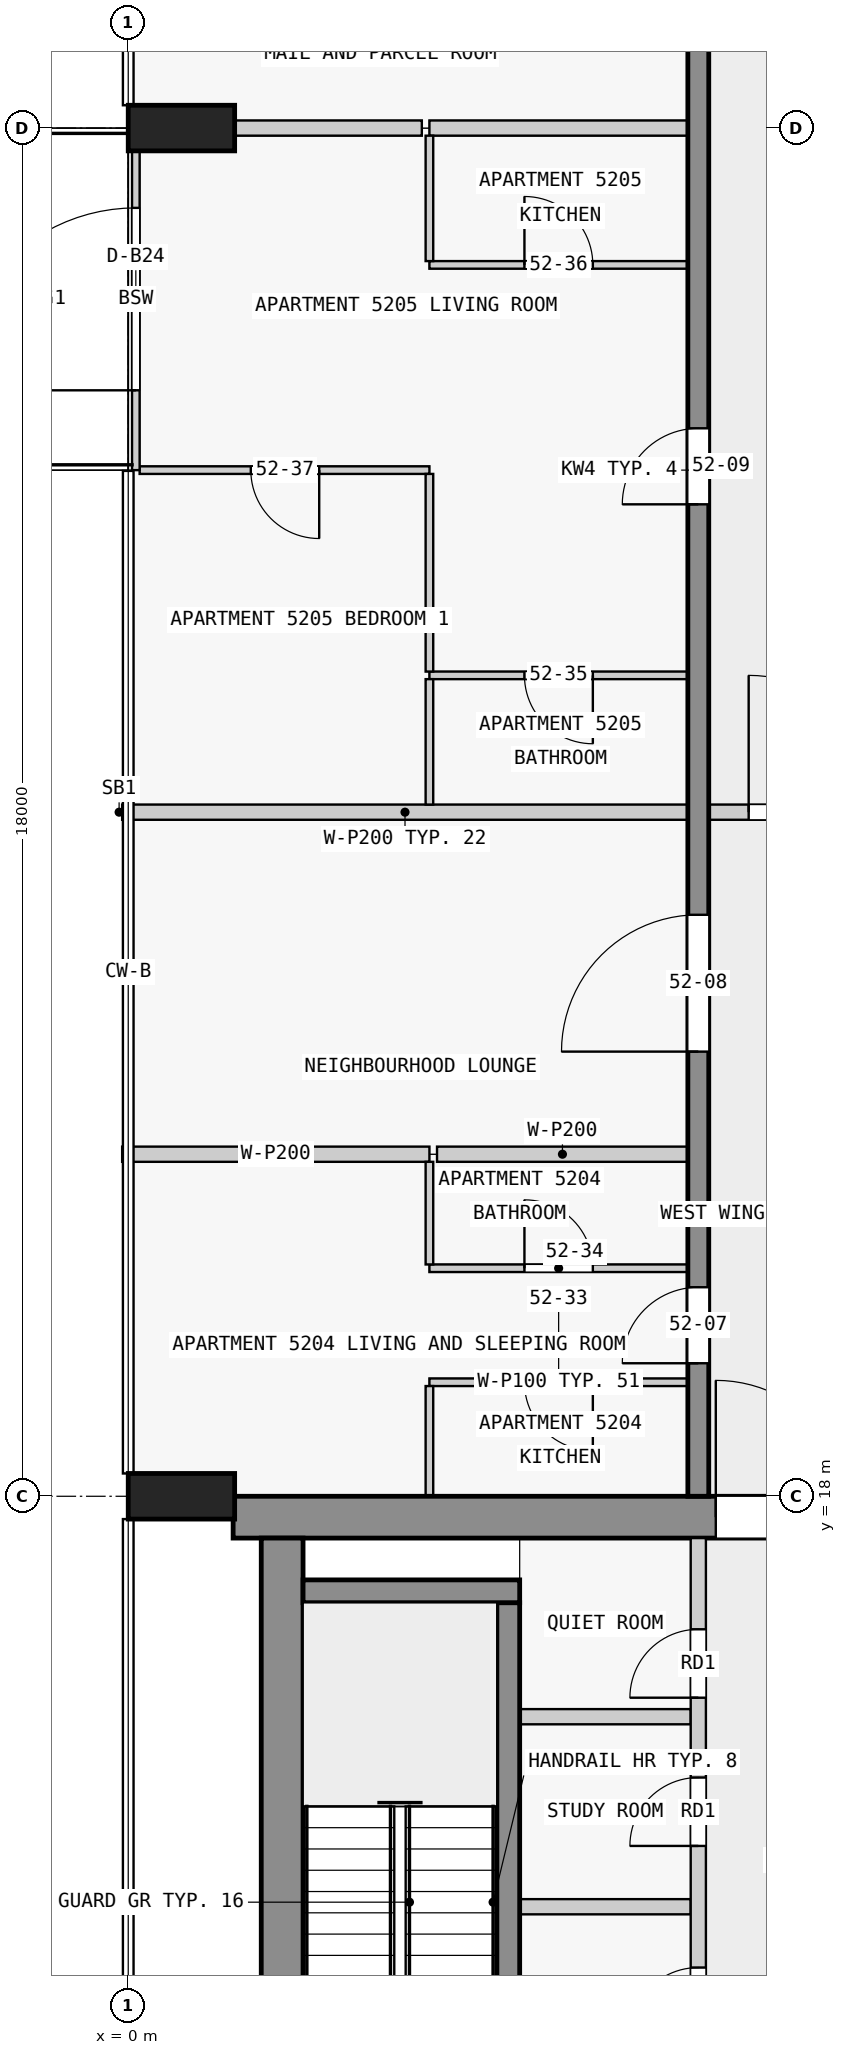
"""IFC4 building model, lengths in metres.
Left out: names, types, materials, properties, quantities, classifications, styles, units other than length and angle.
Written with IfcOpenShell. Run it as: python <this file> out.ifc"""

import sys

from ifc_helpers import new_model, si_unit, direction, frame, frame_2d, origin, origin_2d, place, context, subcontext, project, spatial, rectangle, extrude, element, fill, save


model = new_model("IFC4")
c1 = context("Model", 3, precision=1e-05, world=origin(), true_north=direction((0.0, 1.0)))
c2 = subcontext(c1, "Body", "Model", "MODEL_VIEW")
j1 = project(units=[si_unit("LENGTHUNIT", "METRE"), si_unit("PLANEANGLEUNIT", "RADIAN")], contexts=[c1])
p1 = place(None, origin())
s1 = spatial("IfcSite", under=j1, at=p1, CompositionType="ELEMENT")
p2 = place(p1, origin())
s2 = spatial("IfcBuilding", under=s1, at=p2, CompositionType="ELEMENT")
p3 = place(p2, frame((0.0, 0.0, 201.4)))
s3 = spatial("IfcBuildingStorey", under=s2, at=p3, CompositionType="ELEMENT", Elevation=201.4)
for number, where, z_axis, x_axis in (
    (1, (0.7, 36.0, 0.0), (0.0, 0.0, 1.0), (0.0, 1.0, 0.0)),
    (2, (0.7, 18.0, 0.0), (0.0, 0.0, 1.0), (0.0, 1.0, 0.0)),
):
    element("IfcColumn", number, at=place(p3, frame(where, z_axis=z_axis, x_axis=x_axis)), inside=s3, PredefinedType="COLUMN", context=c2, shape_type="SweptSolid", body=[
        extrude(rectangle(XDim=0.6, YDim=1.4, at=origin_2d()), origin(), (0.0, 0.0, 1.0), 3.5),
    ])
p4 = place(p3, frame((1.38, 17.725, 0.0), z_axis=(0.0, 0.0, 1.0), x_axis=(1.0, 0.0, 0.0)))
e3 = element("IfcWall", 3, at=p4, inside=s3, PredefinedType="SHEAR", context=c2, shape_type="SweptSolid", body=[
    extrude(rectangle(XDim=21.12, YDim=0.55, at=frame_2d((10.56, 0.0))), origin(), (0.0, 0.0, 1.0), 3.25),
])
p5 = place(p4, frame((6.35, 0.0, 0.0)))
e4 = element("IfcOpeningElement", 4, at=p5, cuts=e3, PredefinedType="OPENING", context=c2, shape_type="SweptSolid", body=[
    extrude(rectangle(XDim=1.8, YDim=2.1, at=frame_2d((0.9, 1.05))), frame((0.0, 0.285, 0.0), z_axis=(0.0, -1.0, 0.0), x_axis=(1.0, 0.0, 0.0)), (0.0, 0.0, 1.0), 0.57),
])
p6 = place(p3, frame((2.025, 2.5, 0.0), z_axis=(0.0, 0.0, 1.0), x_axis=(0.0, 1.0, 0.0)))
e5 = element("IfcWall", 5, at=p6, inside=s3, PredefinedType="SHEAR", context=c2, shape_type="SweptSolid", body=[
    extrude(rectangle(XDim=14.95, YDim=0.55, at=frame_2d((7.475, 0.0))), origin(), (0.0, 0.0, 1.0), 3.25),
])
p7 = place(p3, frame((5.0, 10.2, 0.0), z_axis=(0.0, 0.0, 1.0), x_axis=(0.0, 1.0, 0.0)))
e6 = element("IfcWall", 6, at=p7, inside=s3, PredefinedType="SHEAR", context=c2, shape_type="SweptSolid", body=[
    extrude(rectangle(XDim=6.4, YDim=0.3, at=frame_2d((3.2, 0.0))), origin(), (0.0, 0.0, 1.0), 3.25),
])
p8 = place(p3, frame((2.3, 16.75, 0.0), z_axis=(0.0, 0.0, 1.0), x_axis=(1.0, 0.0, 0.0)))
e7 = element("IfcWall", 7, at=p8, inside=s3, PredefinedType="SHEAR", context=c2, shape_type="SweptSolid", body=[
    extrude(rectangle(XDim=2.85, YDim=0.3, at=frame_2d((1.425, 0.0))), origin(), (0.0, 0.0, 1.0), 3.25),
])
p9 = place(p3, frame((7.5, 18.0, 0.0), z_axis=(0.0, 0.0, 1.0), x_axis=(0.0, 1.0, 0.0)))
e8 = element("IfcWall", 8, at=p9, inside=s3, PredefinedType="SHEAR", context=c2, shape_type="SweptSolid", body=[
    extrude(rectangle(XDim=27.0, YDim=0.275, at=frame_2d((13.5, 0.0))), origin(), (0.0, 0.0, 1.0), 3.25),
])
p10 = place(p9, frame((1.75, 0.0, 0.0)))
e9 = element("IfcOpeningElement", 9, at=p10, cuts=e8, PredefinedType="OPENING", context=c2, shape_type="SweptSolid", body=[
    extrude(rectangle(XDim=1.0, YDim=2.1, at=frame_2d((0.5, 1.05))), frame((0.0, 0.147, 0.0), z_axis=(0.0, -1.0, 0.0), x_axis=(1.0, 0.0, 0.0)), (0.0, 0.0, 1.0), 0.295),
])
p11 = place(p9, frame((5.85, 0.0, 0.0)))
e10 = element("IfcOpeningElement", 10, at=p11, cuts=e8, PredefinedType="OPENING", context=c2, shape_type="SweptSolid", body=[
    extrude(rectangle(XDim=1.8, YDim=2.1, at=frame_2d((0.9, 1.05))), frame((0.0, 0.147, 0.0), z_axis=(0.0, -1.0, 0.0), x_axis=(1.0, 0.0, 0.0)), (0.0, 0.0, 1.0), 0.295),
])
p12 = place(p9, frame((13.05, 0.0, 0.0)))
e11 = element("IfcOpeningElement", 11, at=p12, cuts=e8, PredefinedType="OPENING", context=c2, shape_type="SweptSolid", body=[
    extrude(rectangle(XDim=1.0, YDim=2.1, at=frame_2d((0.5, 1.05))), frame((0.0, 0.147, 0.0), z_axis=(0.0, -1.0, 0.0), x_axis=(1.0, 0.0, 0.0)), (0.0, 0.0, 1.0), 0.295),
])
p13 = place(p9, frame((19.75, 0.0, 0.0)))
e12 = element("IfcOpeningElement", 12, at=p13, cuts=e8, PredefinedType="OPENING", context=c2, shape_type="SweptSolid", body=[
    extrude(rectangle(XDim=1.0, YDim=2.1, at=frame_2d((0.5, 1.05))), frame((0.0, 0.147, 0.0), z_axis=(0.0, -1.0, 0.0), x_axis=(1.0, 0.0, 0.0)), (0.0, 0.0, 1.0), 0.295),
])
p14 = place(p9, frame((23.25, 0.0, 0.0)))
e13 = element("IfcOpeningElement", 13, at=p14, cuts=e8, PredefinedType="OPENING", context=c2, shape_type="SweptSolid", body=[
    extrude(rectangle(XDim=0.9, YDim=2.1, at=frame_2d((0.45, 1.05))), frame((0.0, 0.147, 0.0), z_axis=(0.0, -1.0, 0.0), x_axis=(1.0, 0.0, 0.0)), (0.0, 0.0, 1.0), 0.295),
])
p15 = place(p9, frame((25.45, 0.0, 0.0)))
e14 = element("IfcOpeningElement", 14, at=p15, cuts=e8, PredefinedType="OPENING", context=c2, shape_type="SweptSolid", body=[
    extrude(rectangle(XDim=1.0, YDim=2.1, at=frame_2d((0.5, 1.05))), frame((0.0, 0.147, 0.0), z_axis=(0.0, -1.0, 0.0), x_axis=(1.0, 0.0, 0.0)), (0.0, 0.0, 1.0), 0.295),
])
p16 = place(p3, frame((0.1, 31.5, 0.0), z_axis=(0.0, 0.0, 1.0), x_axis=(0.0, 1.0, 0.0)))
e15 = element("IfcWall", 15, at=p16, inside=s3, PredefinedType="STANDARD", context=c2, shape_type="SweptSolid", body=[
    extrude(rectangle(XDim=4.5, YDim=0.1, at=frame_2d((2.25, 0.0))), origin(), (0.0, 0.0, 1.0), 3.25),
])
p17 = place(p16, frame((1.05, 0.0, 0.0)))
e16 = element("IfcOpeningElement", 16, at=p17, cuts=e15, PredefinedType="OPENING", context=c2, shape_type="SweptSolid", body=[
    extrude(rectangle(XDim=2.4, YDim=2.4, at=frame_2d((1.2, 1.2))), frame((0.0, 0.06, 0.0), z_axis=(0.0, -1.0, 0.0), x_axis=(1.0, 0.0, 0.0)), (0.0, 0.0, 1.0), 0.12),
])
p18 = place(p3, frame((7.5, 10.1, 0.0), z_axis=(0.0, 0.0, 1.0), x_axis=(0.0, 1.0, 0.0)))
e17 = element("IfcWall", 17, at=p18, inside=s3, PredefinedType="PARTITIONING", context=c2, shape_type="SweptSolid", body=[
    extrude(rectangle(XDim=7.35, YDim=0.2, at=frame_2d((3.675, 0.0))), origin(), (0.0, 0.0, 1.0), 3.25),
])
p19 = place(p18, frame((0.8, 0.0, 0.0)))
e18 = element("IfcOpeningElement", 18, at=p19, cuts=e17, PredefinedType="OPENING", context=c2, shape_type="SweptSolid", body=[
    extrude(rectangle(XDim=0.9, YDim=2.1, at=frame_2d((0.45, 1.05))), frame((0.0, 0.11, 0.0), z_axis=(0.0, -1.0, 0.0), x_axis=(1.0, 0.0, 0.0)), (0.0, 0.0, 1.0), 0.22),
])
p20 = place(p18, frame((3.3, 0.0, 0.0)))
e19 = element("IfcOpeningElement", 19, at=p20, cuts=e17, PredefinedType="OPENING", context=c2, shape_type="SweptSolid", body=[
    extrude(rectangle(XDim=0.9, YDim=2.1, at=frame_2d((0.45, 1.05))), frame((0.0, 0.11, 0.0), z_axis=(0.0, -1.0, 0.0), x_axis=(1.0, 0.0, 0.0)), (0.0, 0.0, 1.0), 0.22),
])
p21 = place(p18, frame((5.25, 0.0, 0.0)))
e20 = element("IfcOpeningElement", 20, at=p21, cuts=e17, PredefinedType="OPENING", context=c2, shape_type="SweptSolid", body=[
    extrude(rectangle(XDim=0.9, YDim=2.1, at=frame_2d((0.45, 1.05))), frame((0.0, 0.11, 0.0), z_axis=(0.0, -1.0, 0.0), x_axis=(1.0, 0.0, 0.0)), (0.0, 0.0, 1.0), 0.22),
])
for number, where, z_axis, x_axis in (
    (21, (5.15, 12.6, 0.0), (0.0, 0.0, 1.0), (1.0, 0.0, 0.0)),
    (22, (5.15, 15.1, 0.0), (0.0, 0.0, 1.0), (1.0, 0.0, 0.0)),
):
    element("IfcWall", number, at=place(p3, frame(where, z_axis=z_axis, x_axis=x_axis)), inside=s3, PredefinedType="PARTITIONING", context=c2, shape_type="SweptSolid", body=[
        extrude(rectangle(XDim=2.25, YDim=0.2, at=frame_2d((1.125, 0.0))), origin(), (0.0, 0.0, 1.0), 3.25),
    ])
p22 = place(p3, frame((7.363, 19.5, 0.0), z_axis=(0.0, 0.0, 1.0), x_axis=(-1.0, 0.0, 0.0)))
e23 = element("IfcWall", 23, at=p22, inside=s3, PredefinedType="PARTITIONING", context=c2, shape_type="SweptSolid", body=[
    extrude(rectangle(XDim=3.4, YDim=0.1, at=frame_2d((1.7, 0.0))), origin(), (0.0, 0.0, 1.0), 3.25),
])
p23 = place(p22, frame((1.25, 0.0, 0.0)))
e24 = element("IfcOpeningElement", 24, at=p23, cuts=e23, PredefinedType="OPENING", context=c2, shape_type="SweptSolid", body=[
    extrude(rectangle(XDim=0.9, YDim=2.1, at=frame_2d((0.45, 1.05))), frame((0.0, 0.06, 0.0), z_axis=(0.0, -1.0, 0.0), x_axis=(1.0, 0.0, 0.0)), (0.0, 0.0, 1.0), 0.12),
])
p24 = place(p3, frame((3.962, 21.0, 0.0), z_axis=(0.0, 0.0, 1.0), x_axis=(1.0, 0.0, 0.0)))
e25 = element("IfcWall", 25, at=p24, inside=s3, PredefinedType="PARTITIONING", context=c2, shape_type="SweptSolid", body=[
    extrude(rectangle(XDim=3.4, YDim=0.1, at=frame_2d((1.7, 0.0))), origin(), (0.0, 0.0, 1.0), 3.25),
])
p25 = place(p24, frame((1.25, 0.0, 0.0)))
e26 = element("IfcOpeningElement", 26, at=p25, cuts=e25, PredefinedType="OPENING", context=c2, shape_type="SweptSolid", body=[
    extrude(rectangle(XDim=0.9, YDim=2.1, at=frame_2d((0.45, 1.05))), frame((0.0, 0.06, 0.0), z_axis=(0.0, -1.0, 0.0), x_axis=(1.0, 0.0, 0.0)), (0.0, 0.0, 1.0), 0.12),
])
p26 = place(p3, frame((7.363, 22.5, 0.0), z_axis=(0.0, 0.0, 1.0), x_axis=(-1.0, 0.0, 0.0)))
e27 = element("IfcWall", 27, at=p26, inside=s3, PredefinedType="PARTITIONING", context=c2, shape_type="SweptSolid", body=[
    extrude(rectangle(XDim=3.3, YDim=0.2, at=frame_2d((1.65, 0.0))), origin(), (0.0, 0.0, 1.0), 3.25),
])
p27 = place(p3, frame((-0.08, 22.5, 0.0), z_axis=(0.0, 0.0, 1.0), x_axis=(1.0, 0.0, 0.0)))
e28 = element("IfcWall", 28, at=p27, inside=s3, PredefinedType="PARTITIONING", context=c2, shape_type="SweptSolid", body=[
    extrude(rectangle(XDim=4.042, YDim=0.2, at=frame_2d((2.021, 0.0))), origin(), (0.0, 0.0, 1.0), 3.25),
])
p28 = place(p3, frame((7.363, 27.0, 0.0), z_axis=(0.0, 0.0, 1.0), x_axis=(-1.0, 0.0, 0.0)))
e29 = element("IfcWall", 29, at=p28, inside=s3, PredefinedType="PARTITIONING", context=c2, shape_type="SweptSolid", body=[
    extrude(rectangle(XDim=7.443, YDim=0.2, at=frame_2d((3.721, 0.0))), origin(), (0.0, 0.0, 1.0), 3.25),
])
p29 = place(p3, frame((7.363, 28.8, 0.0), z_axis=(0.0, 0.0, 1.0), x_axis=(-1.0, 0.0, 0.0)))
e30 = element("IfcWall", 30, at=p29, inside=s3, PredefinedType="PARTITIONING", context=c2, shape_type="SweptSolid", body=[
    extrude(rectangle(XDim=3.4, YDim=0.1, at=frame_2d((1.7, 0.0))), origin(), (0.0, 0.0, 1.0), 3.25),
])
p30 = place(p29, frame((1.25, 0.0, 0.0)))
e31 = element("IfcOpeningElement", 31, at=p30, cuts=e30, PredefinedType="OPENING", context=c2, shape_type="SweptSolid", body=[
    extrude(rectangle(XDim=0.9, YDim=2.1, at=frame_2d((0.45, 1.05))), frame((0.0, 0.06, 0.0), z_axis=(0.0, -1.0, 0.0), x_axis=(1.0, 0.0, 0.0)), (0.0, 0.0, 1.0), 0.12),
])
p31 = place(p3, frame((3.962, 31.5, 0.0), z_axis=(0.0, 0.0, 1.0), x_axis=(-1.0, 0.0, 0.0)))
e32 = element("IfcWall", 32, at=p31, inside=s3, PredefinedType="PARTITIONING", context=c2, shape_type="SweptSolid", body=[
    extrude(rectangle(XDim=3.812, YDim=0.1, at=frame_2d((1.906, 0.0))), origin(), (0.0, 0.0, 1.0), 3.25),
])
p32 = place(p31, frame((1.45, 0.0, 0.0)))
e33 = element("IfcOpeningElement", 33, at=p32, cuts=e32, PredefinedType="OPENING", context=c2, shape_type="SweptSolid", body=[
    extrude(rectangle(XDim=0.9, YDim=2.1, at=frame_2d((0.45, 1.05))), frame((0.0, 0.06, 0.0), z_axis=(0.0, -1.0, 0.0), x_axis=(1.0, 0.0, 0.0)), (0.0, 0.0, 1.0), 0.12),
])
p33 = place(p3, frame((3.962, 34.2, 0.0), z_axis=(0.0, 0.0, 1.0), x_axis=(1.0, 0.0, 0.0)))
e34 = element("IfcWall", 34, at=p33, inside=s3, PredefinedType="PARTITIONING", context=c2, shape_type="SweptSolid", body=[
    extrude(rectangle(XDim=3.4, YDim=0.1, at=frame_2d((1.7, 0.0))), origin(), (0.0, 0.0, 1.0), 3.25),
])
p34 = place(p33, frame((1.25, 0.0, 0.0)))
e35 = element("IfcOpeningElement", 35, at=p34, cuts=e34, PredefinedType="OPENING", context=c2, shape_type="SweptSolid", body=[
    extrude(rectangle(XDim=0.9, YDim=2.1, at=frame_2d((0.45, 1.05))), frame((0.0, 0.06, 0.0), z_axis=(0.0, -1.0, 0.0), x_axis=(1.0, 0.0, 0.0)), (0.0, 0.0, 1.0), 0.12),
])
p35 = place(p3, frame((7.363, 36.0, 0.0), z_axis=(0.0, 0.0, 1.0), x_axis=(-1.0, 0.0, 0.0)))
e36 = element("IfcWall", 36, at=p35, inside=s3, PredefinedType="PARTITIONING", context=c2, shape_type="SweptSolid", body=[
    extrude(rectangle(XDim=3.4, YDim=0.2, at=frame_2d((1.7, 0.0))), origin(), (0.0, 0.0, 1.0), 3.25),
])
p36 = place(p3, frame((1.4, 36.0, 0.0), z_axis=(0.0, 0.0, 1.0), x_axis=(1.0, 0.0, 0.0)))
e37 = element("IfcWall", 37, at=p36, inside=s3, PredefinedType="PARTITIONING", context=c2, shape_type="SweptSolid", body=[
    extrude(rectangle(XDim=2.463, YDim=0.2, at=frame_2d((1.231, 0.0))), origin(), (0.0, 0.0, 1.0), 3.25),
])
p37 = place(p3, frame((3.962, 19.45, 0.0), z_axis=(0.0, 0.0, 1.0), x_axis=(0.0, -1.0, 0.0)))
e38 = element("IfcWall", 38, at=p37, inside=s3, PredefinedType="PARTITIONING", context=c2, shape_type="SweptSolid", body=[
    extrude(rectangle(XDim=1.45, YDim=0.1, at=frame_2d((0.725, 0.0))), origin(), (0.0, 0.0, 1.0), 3.25),
])
p38 = place(p3, frame((3.962, 22.4, 0.0), z_axis=(0.0, 0.0, 1.0), x_axis=(0.0, -1.0, 0.0)))
e39 = element("IfcWall", 39, at=p38, inside=s3, PredefinedType="PARTITIONING", context=c2, shape_type="SweptSolid", body=[
    extrude(rectangle(XDim=1.35, YDim=0.1, at=frame_2d((0.675, 0.0))), origin(), (0.0, 0.0, 1.0), 3.25),
])
for number, where, z_axis, x_axis in (
    (40, (3.962, 28.75, 0.0), (0.0, 0.0, 1.0), (0.0, -1.0, 0.0)),
    (41, (3.962, 35.9, 0.0), (0.0, 0.0, 1.0), (0.0, -1.0, 0.0)),
):
    element("IfcWall", number, at=place(p3, frame(where, z_axis=z_axis, x_axis=x_axis)), inside=s3, PredefinedType="PARTITIONING", context=c2, shape_type="SweptSolid", body=[
        extrude(rectangle(XDim=1.65, YDim=0.1, at=frame_2d((0.825, 0.0))), origin(), (0.0, 0.0, 1.0), 3.25),
    ])
p39 = place(p3, frame((3.962, 28.85, 0.0), z_axis=(0.0, 0.0, 1.0), x_axis=(0.0, 1.0, 0.0)))
e42 = element("IfcWall", 42, at=p39, inside=s3, PredefinedType="PARTITIONING", context=c2, shape_type="SweptSolid", body=[
    extrude(rectangle(XDim=2.6, YDim=0.1, at=frame_2d((1.3, 0.0))), origin(), (0.0, 0.0, 1.0), 3.25),
])
p40 = place(p3, frame((7.462, 27.0, 0.0), z_axis=(0.0, 0.0, 1.0), x_axis=(1.0, 0.0, 0.0)))
e43 = element("IfcWall", 43, at=p40, inside=s3, PredefinedType="PARTITIONING", context=c2, shape_type="SweptSolid", body=[
    extrude(rectangle(XDim=3.175, YDim=0.2, at=frame_2d((1.587, 0.0))), origin(), (0.0, 0.0, 1.0), 3.25),
])
p41 = place(p40, frame((0.7, 0.0, 0.0)))
e44 = element("IfcOpeningElement", 44, at=p41, cuts=e43, PredefinedType="OPENING", context=c2, shape_type="SweptSolid", body=[
    extrude(rectangle(XDim=1.8, YDim=2.1, at=frame_2d((0.9, 1.05))), frame((0.0, 0.11, 0.0), z_axis=(0.0, -1.0, 0.0), x_axis=(1.0, 0.0, 0.0)), (0.0, 0.0, 1.0), 0.22),
])
p42 = place(p17, origin())
e45 = element("IfcDoor", 45, at=p42, inside=s3, OperationType="SINGLE_SWING_LEFT", PredefinedType="DOOR", context=c2, shape_type="SweptSolid", body=[
    extrude(rectangle(XDim=2.4, YDim=2.4, at=frame_2d((1.2, 1.2))), frame((0.0, 0.025, 0.0), z_axis=(0.0, -1.0, 0.0), x_axis=(1.0, 0.0, 0.0)), (0.0, 0.0, 1.0), 0.05),
])
fill(e16, e45)
p43 = place(p5, origin())
e46 = element("IfcDoor", 46, at=p43, inside=s3, OperationType="DOUBLE_DOOR_SINGLE_SWING", PredefinedType="DOOR", context=c2, shape_type="SweptSolid", body=[
    extrude(rectangle(XDim=1.8, YDim=2.1, at=frame_2d((0.9, 1.05))), frame((0.0, 0.025, 0.0), z_axis=(0.0, -1.0, 0.0), x_axis=(1.0, 0.0, 0.0)), (0.0, 0.0, 1.0), 0.05),
])
fill(e4, e46)
p44 = place(p19, origin())
e47 = element("IfcDoor", 47, at=p44, inside=s3, OperationType="SINGLE_SWING_RIGHT", PredefinedType="DOOR", context=c2, shape_type="SweptSolid", body=[
    extrude(rectangle(XDim=0.9, YDim=2.1, at=frame_2d((0.45, 1.05))), frame((0.0, 0.025, 0.0), z_axis=(0.0, -1.0, 0.0), x_axis=(1.0, 0.0, 0.0)), (0.0, 0.0, 1.0), 0.05),
])
fill(e18, e47)
p45 = place(p20, origin())
e48 = element("IfcDoor", 48, at=p45, inside=s3, OperationType="SINGLE_SWING_RIGHT", PredefinedType="DOOR", context=c2, shape_type="SweptSolid", body=[
    extrude(rectangle(XDim=0.9, YDim=2.1, at=frame_2d((0.45, 1.05))), frame((0.0, 0.025, 0.0), z_axis=(0.0, -1.0, 0.0), x_axis=(1.0, 0.0, 0.0)), (0.0, 0.0, 1.0), 0.05),
])
fill(e19, e48)
p46 = place(p21, origin())
e49 = element("IfcDoor", 49, at=p46, inside=s3, OperationType="SINGLE_SWING_RIGHT", PredefinedType="DOOR", context=c2, shape_type="SweptSolid", body=[
    extrude(rectangle(XDim=0.9, YDim=2.1, at=frame_2d((0.45, 1.05))), frame((0.0, 0.025, 0.0), z_axis=(0.0, -1.0, 0.0), x_axis=(1.0, 0.0, 0.0)), (0.0, 0.0, 1.0), 0.05),
])
fill(e20, e49)
p47 = place(p10, origin())
e50 = element("IfcDoor", 50, at=p47, inside=s3, OperationType="SINGLE_SWING_LEFT", PredefinedType="DOOR", context=c2, shape_type="SweptSolid", body=[
    extrude(rectangle(XDim=1.0, YDim=2.1, at=frame_2d((0.5, 1.05))), frame((0.0, 0.025, 0.0), z_axis=(0.0, -1.0, 0.0), x_axis=(1.0, 0.0, 0.0)), (0.0, 0.0, 1.0), 0.05),
])
fill(e9, e50)
p48 = place(p11, origin())
e51 = element("IfcDoor", 51, at=p48, inside=s3, OperationType="SINGLE_SWING_LEFT", PredefinedType="DOOR", context=c2, shape_type="SweptSolid", body=[
    extrude(rectangle(XDim=1.8, YDim=2.1, at=frame_2d((0.9, 1.05))), frame((0.0, 0.025, 0.0), z_axis=(0.0, -1.0, 0.0), x_axis=(1.0, 0.0, 0.0)), (0.0, 0.0, 1.0), 0.05),
])
fill(e10, e51)
p49 = place(p12, origin())
e52 = element("IfcDoor", 52, at=p49, inside=s3, OperationType="SINGLE_SWING_RIGHT", PredefinedType="DOOR", context=c2, shape_type="SweptSolid", body=[
    extrude(rectangle(XDim=1.0, YDim=2.1, at=frame_2d((0.5, 1.05))), frame((0.0, 0.025, 0.0), z_axis=(0.0, -1.0, 0.0), x_axis=(1.0, 0.0, 0.0)), (0.0, 0.0, 1.0), 0.05),
])
fill(e11, e52)
p50 = place(p41, origin())
e53 = element("IfcDoor", 53, at=p50, inside=s3, OperationType="SINGLE_SWING_RIGHT", PredefinedType="DOOR", context=c2, shape_type="SweptSolid", body=[
    extrude(rectangle(XDim=1.8, YDim=2.1, at=frame_2d((0.9, 1.05))), frame((0.0, 0.025, 0.0), z_axis=(0.0, -1.0, 0.0), x_axis=(1.0, 0.0, 0.0)), (0.0, 0.0, 1.0), 0.05),
])
fill(e44, e53)
p51 = place(p23, origin())
e54 = element("IfcDoor", 54, at=p51, inside=s3, OperationType="SINGLE_SWING_LEFT", PredefinedType="DOOR", context=c2, shape_type="SweptSolid", body=[
    extrude(rectangle(XDim=0.9, YDim=2.1, at=frame_2d((0.45, 1.05))), frame((0.0, 0.025, 0.0), z_axis=(0.0, -1.0, 0.0), x_axis=(1.0, 0.0, 0.0)), (0.0, 0.0, 1.0), 0.05),
])
fill(e24, e54)
p52 = place(p25, origin())
e55 = element("IfcDoor", 55, at=p52, inside=s3, OperationType="SINGLE_SWING_LEFT", PredefinedType="DOOR", context=c2, shape_type="SweptSolid", body=[
    extrude(rectangle(XDim=0.9, YDim=2.1, at=frame_2d((0.45, 1.05))), frame((0.0, 0.025, 0.0), z_axis=(0.0, -1.0, 0.0), x_axis=(1.0, 0.0, 0.0)), (0.0, 0.0, 1.0), 0.05),
])
fill(e26, e55)
p53 = place(p30, origin())
e56 = element("IfcDoor", 56, at=p53, inside=s3, OperationType="SINGLE_SWING_LEFT", PredefinedType="DOOR", context=c2, shape_type="SweptSolid", body=[
    extrude(rectangle(XDim=0.9, YDim=2.1, at=frame_2d((0.45, 1.05))), frame((0.0, 0.025, 0.0), z_axis=(0.0, -1.0, 0.0), x_axis=(1.0, 0.0, 0.0)), (0.0, 0.0, 1.0), 0.05),
])
fill(e31, e56)
p54 = place(p34, origin())
e57 = element("IfcDoor", 57, at=p54, inside=s3, OperationType="SINGLE_SWING_LEFT", PredefinedType="DOOR", context=c2, shape_type="SweptSolid", body=[
    extrude(rectangle(XDim=0.9, YDim=2.1, at=frame_2d((0.45, 1.05))), frame((0.0, 0.025, 0.0), z_axis=(0.0, -1.0, 0.0), x_axis=(1.0, 0.0, 0.0)), (0.0, 0.0, 1.0), 0.05),
])
fill(e35, e57)
p55 = place(p32, origin())
e58 = element("IfcDoor", 58, at=p55, inside=s3, OperationType="SINGLE_SWING_LEFT", PredefinedType="DOOR", context=c2, shape_type="SweptSolid", body=[
    extrude(rectangle(XDim=0.9, YDim=2.1, at=frame_2d((0.45, 1.05))), frame((0.0, 0.025, 0.0), z_axis=(0.0, -1.0, 0.0), x_axis=(1.0, 0.0, 0.0)), (0.0, 0.0, 1.0), 0.05),
])
fill(e33, e58)
save(model, sys.argv[1])
